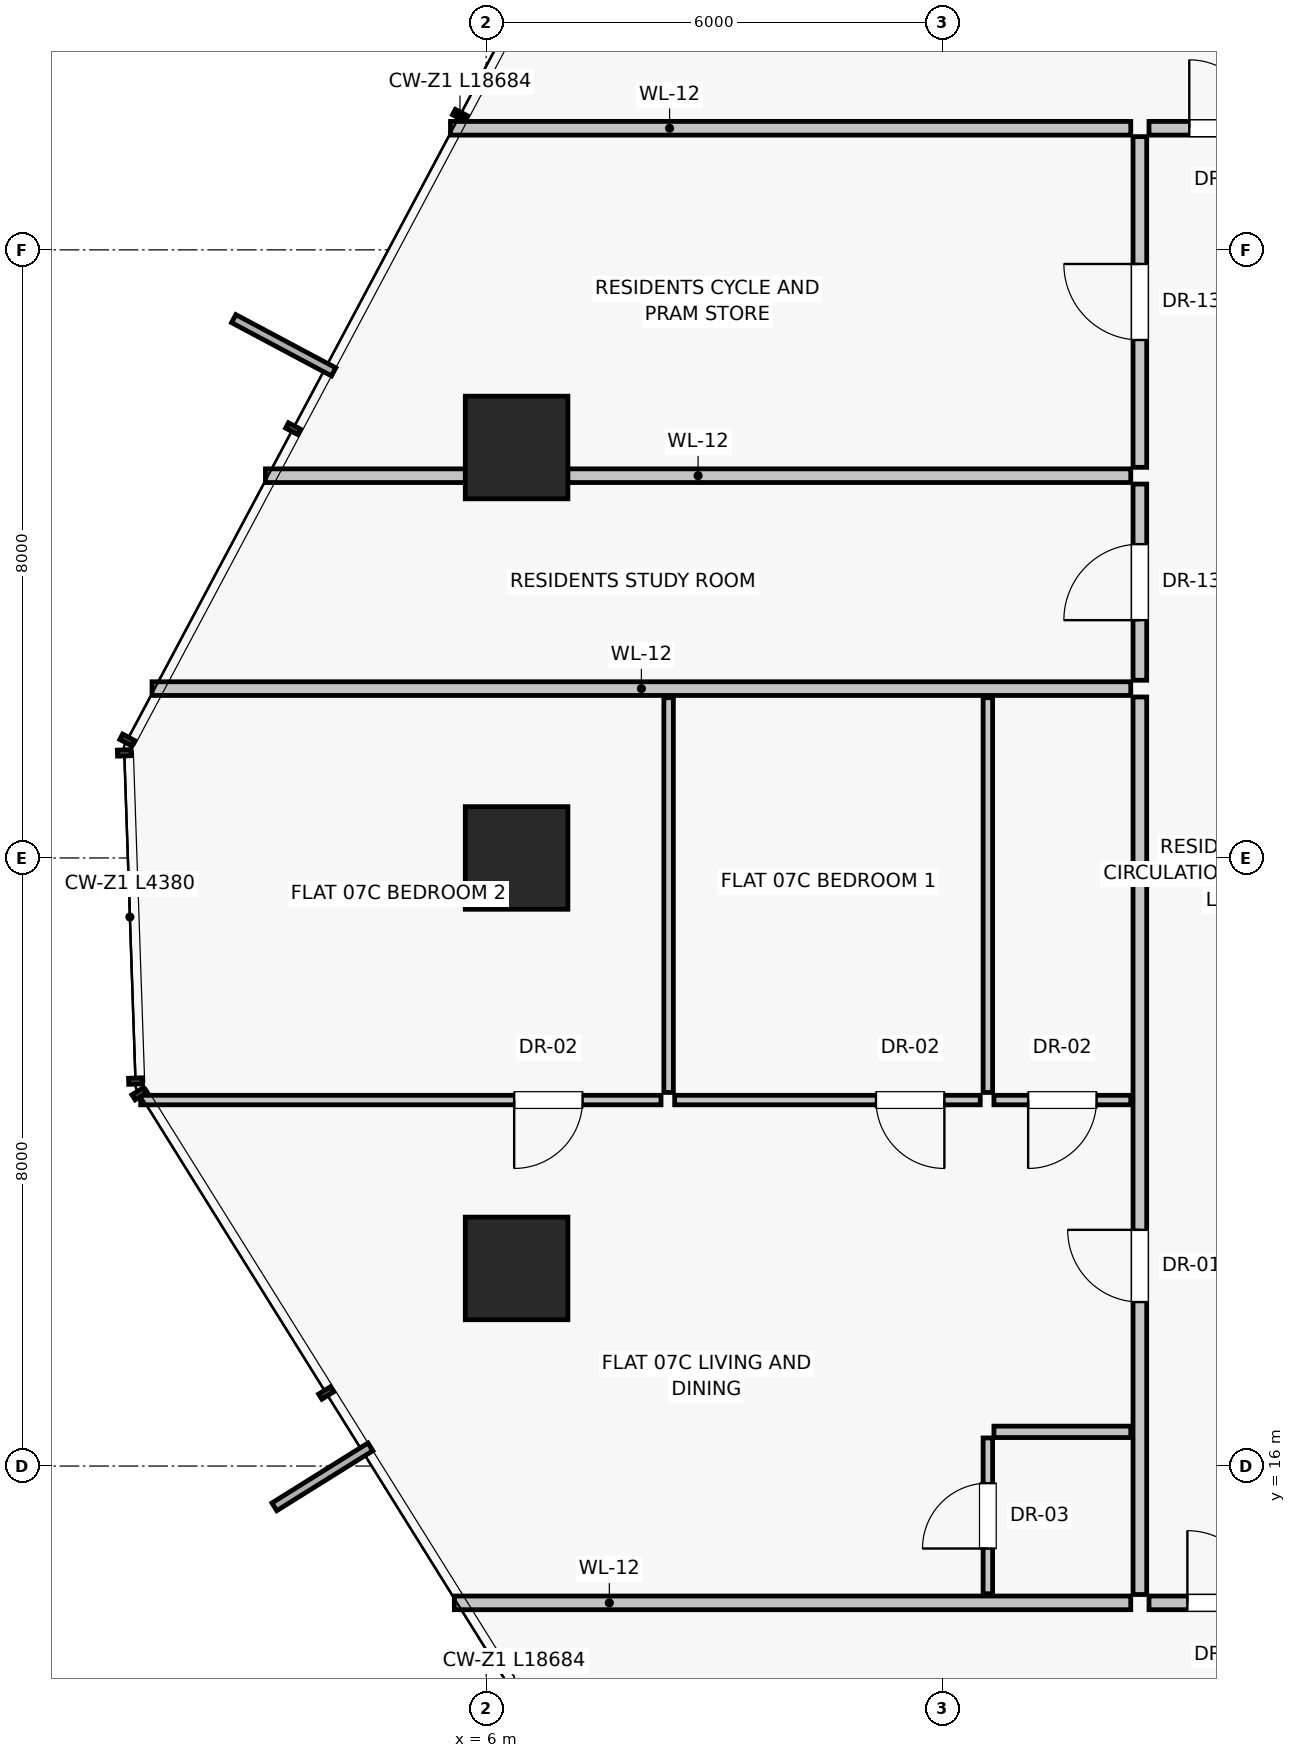
"""IFC4 building model, lengths in metres.
Left out: names, types, materials, properties, quantities, classifications, styles, units other than length and angle.
Written with IfcOpenShell. Run it as: python <this file> out.ifc"""

import sys

from ifc_helpers import new_model, si_unit, direction, frame, frame_2d, origin, origin_2d, place, context, subcontext, project, spatial, rectangle, extrude, source, transform, mapped, element, fill, save


model = new_model("IFC4")
c1 = context("Model", 3, precision=1e-05, world=origin(), true_north=direction((0.0, 1.0)))
c2 = subcontext(c1, "Body", "Model", "MODEL_VIEW")
j1 = project(units=[si_unit("LENGTHUNIT", "METRE"), si_unit("PLANEANGLEUNIT", "RADIAN")], contexts=[c1])
p1 = place(None, origin())
s1 = spatial("IfcSite", under=j1, at=p1, CompositionType="ELEMENT")
p2 = place(p1, origin())
s2 = spatial("IfcBuilding", under=s1, at=p2, CompositionType="ELEMENT")
p3 = place(p2, frame((0.0, 0.0, 30.55)))
s3 = spatial("IfcBuildingStorey", under=s2, at=p3, CompositionType="ELEMENT", Elevation=30.55)
for number, where, z_axis, x_axis in (
    (1, (6.4, 29.4, 0.0), (0.0, 0.0, 1.0), (1.0, 0.0, 0.0)),
    (2, (6.4, 24.0, 0.0), (0.0, 0.0, 1.0), (1.0, 0.0, 0.0)),
    (3, (6.4, 18.6, 0.0), (0.0, 0.0, 1.0), (1.0, 0.0, 0.0)),
):
    element("IfcColumn", number, at=place(p3, frame(where, z_axis=z_axis, x_axis=x_axis)), inside=s3, PredefinedType="COLUMN", context=c2, shape_type="SweptSolid", body=[
        extrude(rectangle(XDim=1.35, YDim=1.35, at=origin_2d()), origin(), (0.0, 0.0, 1.0), 3.25),
    ])
p4 = place(p3, frame((14.48, 14.2, 0.0), z_axis=(0.0, 0.0, 1.0), x_axis=(-1.0, 0.0, 0.0)))
e4 = element("IfcWall", 4, at=p4, inside=s3, PredefinedType="PARTITIONING", context=c2, shape_type="SweptSolid", body=[
    extrude(rectangle(XDim=8.899, YDim=0.18, at=frame_2d((4.45, 0.0))), origin(), (0.0, 0.0, 1.0), 3.0),
])
p5 = place(p3, frame((14.48, 33.6, 0.0), z_axis=(0.0, 0.0, 1.0), x_axis=(-1.0, 0.0, 0.0)))
e5 = element("IfcWall", 5, at=p5, inside=s3, PredefinedType="PARTITIONING", context=c2, shape_type="SweptSolid", body=[
    extrude(rectangle(XDim=8.95, YDim=0.18, at=frame_2d((4.475, 0.0))), origin(), (0.0, 0.0, 1.0), 3.0),
])
p6 = place(p3, frame((14.6, 14.31, 0.0), z_axis=(0.0, 0.0, 1.0), x_axis=(0.0, 1.0, 0.0)))
e6 = element("IfcWall", 6, at=p6, inside=s3, PredefinedType="PARTITIONING", context=c2, shape_type="SweptSolid", body=[
    extrude(rectangle(XDim=11.808, YDim=0.18, at=frame_2d((5.904, 0.0))), origin(), (0.0, 0.0, 1.0), 3.0),
])
p7 = place(p6, frame((3.847, 0.0, 0.0)))
e7 = element("IfcOpeningElement", 7, at=p7, cuts=e6, PredefinedType="OPENING", context=c2, shape_type="SweptSolid", body=[
    extrude(rectangle(XDim=0.95, YDim=2.02, at=frame_2d((0.475, 1.01))), frame((0.0, 0.1, 0.0), z_axis=(0.0, -1.0, 0.0), x_axis=(1.0, 0.0, 0.0)), (0.0, 0.0, 1.0), 0.2),
])
p8 = place(p3, frame((14.48, 16.45, 0.0), z_axis=(0.0, 0.0, 1.0), x_axis=(-1.0, 0.0, 0.0)))
e8 = element("IfcWall", 8, at=p8, inside=s3, PredefinedType="PARTITIONING", context=c2, shape_type="SweptSolid", body=[
    extrude(rectangle(XDim=1.8, YDim=0.15, at=frame_2d((0.9, 0.0))), origin(), (0.0, 0.0, 1.0), 3.0),
])
p9 = place(p3, frame((12.6, 14.32, 0.0), z_axis=(0.0, 0.0, 1.0), x_axis=(0.0, 1.0, 0.0)))
e9 = element("IfcWall", 9, at=p9, inside=s3, PredefinedType="PARTITIONING", context=c2, shape_type="SweptSolid", body=[
    extrude(rectangle(XDim=2.05, YDim=0.125, at=frame_2d((1.025, 0.0))), origin(), (0.0, 0.0, 1.0), 3.0),
])
p10 = place(p9, frame((0.595, 0.0, 0.0)))
e10 = element("IfcOpeningElement", 10, at=p10, cuts=e9, PredefinedType="OPENING", context=c2, shape_type="SweptSolid", body=[
    extrude(rectangle(XDim=0.86, YDim=2.01, at=frame_2d((0.43, 1.005))), frame((0.0, 0.073, 0.0), z_axis=(0.0, -1.0, 0.0), x_axis=(1.0, 0.0, 0.0)), (0.0, 0.0, 1.0), 0.145),
])
p11 = place(p3, frame((14.48, 20.815, 0.0), z_axis=(0.0, 0.0, 1.0), x_axis=(-1.0, 0.0, 0.0)))
e11 = element("IfcWall", 11, at=p11, inside=s3, PredefinedType="PARTITIONING", context=c2, shape_type="SweptSolid", body=[
    extrude(rectangle(XDim=1.8, YDim=0.125, at=frame_2d((0.9, 0.0))), origin(), (0.0, 0.0, 1.0), 3.0),
])
p12 = place(p11, frame((0.45, 0.0, 0.0)))
e12 = element("IfcOpeningElement", 12, at=p12, cuts=e11, PredefinedType="OPENING", context=c2, shape_type="SweptSolid", body=[
    extrude(rectangle(XDim=0.9, YDim=2.01, at=frame_2d((0.45, 1.005))), frame((0.0, 0.073, 0.0), z_axis=(0.0, -1.0, 0.0), x_axis=(1.0, 0.0, 0.0)), (0.0, 0.0, 1.0), 0.145),
])
for number, where, z_axis, x_axis in (
    (13, (12.6, 20.915, 0.0), (0.0, 0.0, 1.0), (0.0, 1.0, 0.0)),
    (14, (8.4, 20.915, 0.0), (0.0, 0.0, 1.0), (0.0, 1.0, 0.0)),
):
    element("IfcWall", number, at=place(p3, frame(where, z_axis=z_axis, x_axis=x_axis)), inside=s3, PredefinedType="PARTITIONING", context=c2, shape_type="SweptSolid", body=[
        extrude(rectangle(XDim=5.193, YDim=0.125, at=frame_2d((2.596, 0.0))), origin(), (0.0, 0.0, 1.0), 3.0),
    ])
p13 = place(p3, frame((12.5, 20.815, 0.0), z_axis=(0.0, 0.0, 1.0), x_axis=(-1.0, 0.0, 0.0)))
e15 = element("IfcWall", 15, at=p13, inside=s3, PredefinedType="PARTITIONING", context=c2, shape_type="SweptSolid", body=[
    extrude(rectangle(XDim=4.02, YDim=0.125, at=frame_2d((2.01, 0.0))), origin(), (0.0, 0.0, 1.0), 3.0),
])
p14 = place(p13, frame((0.472, 0.0, 0.0)))
e16 = element("IfcOpeningElement", 16, at=p14, cuts=e15, PredefinedType="OPENING", context=c2, shape_type="SweptSolid", body=[
    extrude(rectangle(XDim=0.9, YDim=2.01, at=frame_2d((0.45, 1.005))), frame((0.0, 0.073, 0.0), z_axis=(0.0, -1.0, 0.0), x_axis=(1.0, 0.0, 0.0)), (0.0, 0.0, 1.0), 0.145),
])
p15 = place(p3, frame((8.3, 20.815, 0.0), z_axis=(0.0, 0.0, 1.0), x_axis=(-1.0, 0.0, 0.0)))
e17 = element("IfcWall", 17, at=p15, inside=s3, PredefinedType="PARTITIONING", context=c2, shape_type="SweptSolid", body=[
    extrude(rectangle(XDim=6.846, YDim=0.125, at=frame_2d((3.423, 0.0))), origin(), (0.0, 0.0, 1.0), 3.0),
])
p16 = place(p15, frame((1.032, 0.0, 0.0)))
e18 = element("IfcOpeningElement", 18, at=p16, cuts=e17, PredefinedType="OPENING", context=c2, shape_type="SweptSolid", body=[
    extrude(rectangle(XDim=0.9, YDim=2.01, at=frame_2d((0.45, 1.005))), frame((0.0, 0.073, 0.0), z_axis=(0.0, -1.0, 0.0), x_axis=(1.0, 0.0, 0.0)), (0.0, 0.0, 1.0), 0.145),
])
p17 = place(p3, frame((14.48, 26.228, 0.0), z_axis=(0.0, 0.0, 1.0), x_axis=(-1.0, 0.0, 0.0)))
e19 = element("IfcWall", 19, at=p17, inside=s3, PredefinedType="PARTITIONING", context=c2, shape_type="SweptSolid", body=[
    extrude(rectangle(XDim=12.876, YDim=0.18, at=frame_2d((6.438, 0.0))), origin(), (0.0, 0.0, 1.0), 3.0),
])
p18 = place(p3, frame((14.6, 26.338, 0.0), z_axis=(0.0, 0.0, 1.0), x_axis=(0.0, 1.0, 0.0)))
e20 = element("IfcWall", 20, at=p18, inside=s3, PredefinedType="PARTITIONING", context=c2, shape_type="SweptSolid", body=[
    extrude(rectangle(XDim=2.581, YDim=0.18, at=frame_2d((1.291, 0.0))), origin(), (0.0, 0.0, 1.0), 3.0),
])
p19 = place(p18, frame((0.791, 0.0, 0.0)))
e21 = element("IfcOpeningElement", 21, at=p19, cuts=e20, PredefinedType="OPENING", context=c2, shape_type="SweptSolid", body=[
    extrude(rectangle(XDim=1.0, YDim=2.01, at=frame_2d((0.5, 1.005))), frame((0.0, 0.1, 0.0), z_axis=(0.0, -1.0, 0.0), x_axis=(1.0, 0.0, 0.0)), (0.0, 0.0, 1.0), 0.2),
])
p20 = place(p3, frame((14.6, 29.139, 0.0), z_axis=(0.0, 0.0, 1.0), x_axis=(0.0, 1.0, 0.0)))
e22 = element("IfcWall", 22, at=p20, inside=s3, PredefinedType="PARTITIONING", context=c2, shape_type="SweptSolid", body=[
    extrude(rectangle(XDim=4.351, YDim=0.18, at=frame_2d((2.176, 0.0))), origin(), (0.0, 0.0, 1.0), 3.0),
])
p21 = place(p20, frame((1.676, 0.0, 0.0)))
e23 = element("IfcOpeningElement", 23, at=p21, cuts=e22, PredefinedType="OPENING", context=c2, shape_type="SweptSolid", body=[
    extrude(rectangle(XDim=1.0, YDim=2.01, at=frame_2d((0.5, 1.005))), frame((0.0, 0.1, 0.0), z_axis=(0.0, -1.0, 0.0), x_axis=(1.0, 0.0, 0.0)), (0.0, 0.0, 1.0), 0.2),
])
p22 = place(p3, frame((14.48, 29.029, 0.0), z_axis=(0.0, 0.0, 1.0), x_axis=(-1.0, 0.0, 0.0)))
e24 = element("IfcWall", 24, at=p22, inside=s3, PredefinedType="PARTITIONING", context=c2, shape_type="SweptSolid", body=[
    extrude(rectangle(XDim=11.384, YDim=0.18, at=frame_2d((5.692, 0.0))), origin(), (0.0, 0.0, 1.0), 2.299),
])
p23 = place(p3, frame((14.72, 14.2, 0.0), z_axis=(0.0, 0.0, 1.0), x_axis=(1.0, 0.0, 0.0)))
e25 = element("IfcWall", 25, at=p23, inside=s3, PredefinedType="PARTITIONING", context=c2, shape_type="SweptSolid", body=[
    extrude(rectangle(XDim=1.96, YDim=0.18, at=frame_2d((0.98, 0.0))), origin(), (0.0, 0.0, 1.0), 3.0),
])
p24 = place(p23, frame((0.505, 0.0, 0.0)))
e26 = element("IfcOpeningElement", 26, at=p24, cuts=e25, PredefinedType="OPENING", context=c2, shape_type="SweptSolid", body=[
    extrude(rectangle(XDim=0.95, YDim=2.02, at=frame_2d((0.475, 1.01))), frame((0.0, 0.1, 0.0), z_axis=(0.0, -1.0, 0.0), x_axis=(1.0, 0.0, 0.0)), (0.0, 0.0, 1.0), 0.2),
])
p25 = place(p3, frame((14.72, 33.6, 0.0), z_axis=(0.0, 0.0, 1.0), x_axis=(1.0, 0.0, 0.0)))
e27 = element("IfcWall", 27, at=p25, inside=s3, PredefinedType="PARTITIONING", context=c2, shape_type="SweptSolid", body=[
    extrude(rectangle(XDim=1.96, YDim=0.18, at=frame_2d((0.98, 0.0))), origin(), (0.0, 0.0, 1.0), 3.0),
])
p26 = place(p25, frame((0.53, 0.0, 0.0)))
e28 = element("IfcOpeningElement", 28, at=p26, cuts=e27, PredefinedType="OPENING", context=c2, shape_type="SweptSolid", body=[
    extrude(rectangle(XDim=0.9, YDim=2.01, at=frame_2d((0.45, 1.005))), frame((0.0, 0.1, 0.0), z_axis=(0.0, -1.0, 0.0), x_axis=(1.0, 0.0, 0.0)), (0.0, 0.0, 1.0), 0.2),
])
m1 = source(origin(), c2, "Body", "SweptSolid", [
    extrude(rectangle(XDim=0.95, YDim=2.02, at=frame_2d((0.475, 1.01))), frame((0.0, 0.025, 0.0), z_axis=(0.0, -1.0, 0.0), x_axis=(1.0, 0.0, 0.0)), (0.0, 0.0, 1.0), 0.05),
])
p27 = place(p7, origin())
e29 = element("IfcDoor", 29, at=p27, inside=s3, OperationType="SINGLE_SWING_RIGHT", PredefinedType="DOOR", context=c2, shape_type="MappedRepresentation", body=[
    mapped(m1, transform((0.0, 0.0, 0.0), scale=1.0)),
])
fill(e7, e29)
m2 = source(origin(), c2, "Body", "SweptSolid", [
    extrude(rectangle(XDim=0.86, YDim=2.01, at=frame_2d((0.43, 1.005))), frame((0.0, 0.025, 0.0), z_axis=(0.0, -1.0, 0.0), x_axis=(1.0, 0.0, 0.0)), (0.0, 0.0, 1.0), 0.05),
])
p28 = place(p10, origin())
e30 = element("IfcDoor", 30, at=p28, inside=s3, OperationType="SINGLE_SWING_LEFT", PredefinedType="DOOR", context=c2, shape_type="MappedRepresentation", body=[
    mapped(m2, transform((0.0, 0.0, 0.0), scale=1.0)),
])
fill(e10, e30)
m3 = source(origin(), c2, "Body", "SweptSolid", [
    extrude(rectangle(XDim=0.9, YDim=2.01, at=frame_2d((0.45, 1.005))), frame((0.0, 0.025, 0.0), z_axis=(0.0, -1.0, 0.0), x_axis=(1.0, 0.0, 0.0)), (0.0, 0.0, 1.0), 0.05),
])
p29 = place(p12, origin())
e31 = element("IfcDoor", 31, at=p29, inside=s3, OperationType="SINGLE_SWING_RIGHT", PredefinedType="DOOR", context=c2, shape_type="MappedRepresentation", body=[
    mapped(m3, transform((0.0, 0.0, 0.0), scale=1.0)),
])
fill(e12, e31)
p30 = place(p14, origin())
e32 = element("IfcDoor", 32, at=p30, inside=s3, OperationType="SINGLE_SWING_LEFT", PredefinedType="DOOR", context=c2, shape_type="MappedRepresentation", body=[
    mapped(m3, transform((0.0, 0.0, 0.0), scale=1.0)),
])
fill(e16, e32)
p31 = place(p16, origin())
e33 = element("IfcDoor", 33, at=p31, inside=s3, OperationType="SINGLE_SWING_RIGHT", PredefinedType="DOOR", context=c2, shape_type="MappedRepresentation", body=[
    mapped(m3, transform((0.0, 0.0, 0.0), scale=1.0)),
])
fill(e18, e33)
m4 = source(origin(), c2, "Body", "SweptSolid", [
    extrude(rectangle(XDim=1.0, YDim=2.01, at=frame_2d((0.5, 1.005))), frame((0.0, 0.025, 0.0), z_axis=(0.0, -1.0, 0.0), x_axis=(1.0, 0.0, 0.0)), (0.0, 0.0, 1.0), 0.05),
])
p32 = place(p19, origin())
e34 = element("IfcDoor", 34, at=p32, inside=s3, OperationType="SINGLE_SWING_LEFT", PredefinedType="DOOR", context=c2, shape_type="MappedRepresentation", body=[
    mapped(m4, transform((0.0, 0.0, 0.0), scale=1.0)),
])
fill(e21, e34)
p33 = place(p21, origin())
e35 = element("IfcDoor", 35, at=p33, inside=s3, OperationType="SINGLE_SWING_RIGHT", PredefinedType="DOOR", context=c2, shape_type="MappedRepresentation", body=[
    mapped(m4, transform((0.0, 0.0, 0.0), scale=1.0)),
])
fill(e23, e35)
p34 = place(p24, origin())
e36 = element("IfcDoor", 36, at=p34, inside=s3, OperationType="SINGLE_SWING_LEFT", PredefinedType="DOOR", context=c2, shape_type="MappedRepresentation", body=[
    mapped(m1, transform((0.0, 0.0, 0.0), scale=1.0)),
])
fill(e26, e36)
p35 = place(p26, origin())
e37 = element("IfcDoor", 37, at=p35, inside=s3, OperationType="SINGLE_SWING_LEFT", PredefinedType="DOOR", context=c2, shape_type="MappedRepresentation", body=[
    mapped(m3, transform((0.0, 0.0, 0.0), scale=1.0)),
])
fill(e28, e37)
save(model, sys.argv[1])
